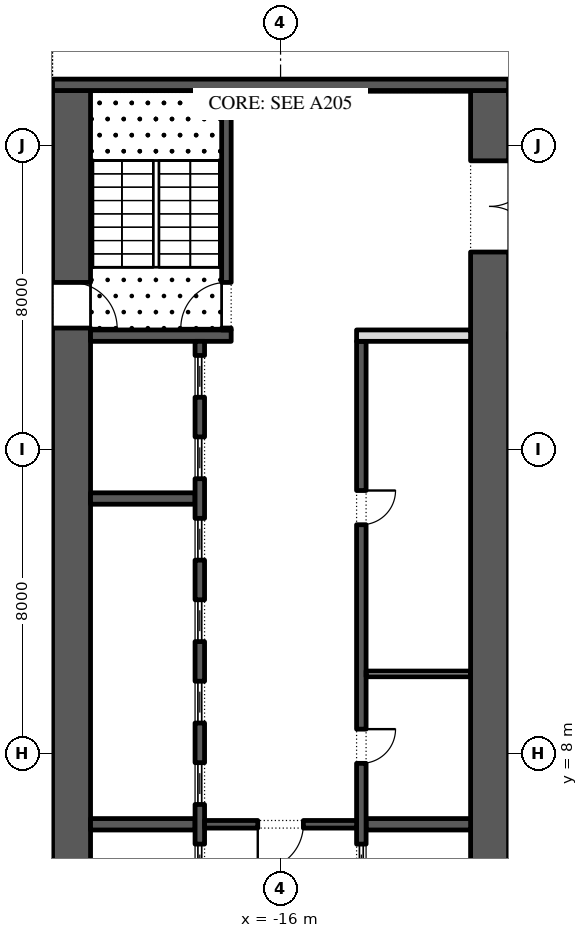
"""IFC4 building model, lengths in metres.
Left out: names, types, materials, properties, quantities, classifications, styles, units other than length and angle.
Written with IfcOpenShell. Run it as: python <this file> out.ifc"""

import sys

from ifc_helpers import new_model, si_unit, direction, frame, frame_2d, origin, place, context, subcontext, project, spatial, rectangle, extrude, element, fill, save


model = new_model("IFC4")
c1 = context("Model", 3, precision=1e-05, world=origin(), true_north=direction((0.0, 1.0)))
c2 = subcontext(c1, "Body", "Model", "MODEL_VIEW")
j1 = project(units=[si_unit("LENGTHUNIT", "METRE"), si_unit("PLANEANGLEUNIT", "RADIAN")], contexts=[c1])
p1 = place(None, origin())
s1 = spatial("IfcSite", under=j1, at=p1, CompositionType="ELEMENT")
p2 = place(p1, origin())
s2 = spatial("IfcBuilding", under=s1, at=p2, CompositionType="ELEMENT")
p3 = place(p2, frame((0.0, 0.0, 14.0)))
s3 = spatial("IfcBuildingStorey", under=s2, at=p3, CompositionType="ELEMENT", Elevation=14.0)
p4 = place(p3, frame((-21.5, -2.45, 0.0), z_axis=(0.0, 0.0, 1.0), x_axis=(0.0, 1.0, 0.0)))
e1 = element("IfcWall", 1, at=p4, inside=s3, PredefinedType="SHEAR", context=c2, shape_type="SweptSolid", body=[
    extrude(rectangle(XDim=27.9, YDim=1.0, at=frame_2d((13.95, 0.0))), origin(), (0.0, 0.0, 1.0), 4.9),
])
p5 = place(p4, frame((5.05, 0.0, 0.0)))
e2 = element("IfcOpeningElement", 2, at=p5, cuts=e1, PredefinedType="OPENING", context=c2, shape_type="SweptSolid", body=[
    extrude(rectangle(XDim=1.2, YDim=2.1, at=frame_2d((0.6, 1.05))), frame((0.0, 0.51, 0.0), z_axis=(0.0, -1.0, 0.0), x_axis=(1.0, 0.0, 0.0)), (0.0, 0.0, 1.0), 1.02),
])
p6 = place(p4, frame((21.65, 0.0, 0.0)))
e3 = element("IfcOpeningElement", 3, at=p6, cuts=e1, PredefinedType="OPENING", context=c2, shape_type="SweptSolid", body=[
    extrude(rectangle(XDim=1.2, YDim=2.1, at=frame_2d((0.6, 1.05))), frame((0.0, 0.51, 0.0), z_axis=(0.0, -1.0, 0.0), x_axis=(1.0, 0.0, 0.0)), (0.0, 0.0, 1.0), 1.02),
])
p7 = place(p3, frame((-10.5, -2.45, 0.0), z_axis=(0.0, 0.0, 1.0), x_axis=(0.0, 1.0, 0.0)))
e4 = element("IfcWall", 4, at=p7, inside=s3, PredefinedType="SHEAR", context=c2, shape_type="SweptSolid", body=[
    extrude(rectangle(XDim=27.9, YDim=1.0, at=frame_2d((13.95, 0.0))), origin(), (0.0, 0.0, 1.0), 4.9),
])
p8 = place(p7, frame((23.65, 0.0, 0.0)))
e5 = element("IfcOpeningElement", 5, at=p8, cuts=e4, PredefinedType="OPENING", context=c2, shape_type="SweptSolid", body=[
    extrude(rectangle(XDim=2.4, YDim=2.1, at=frame_2d((1.2, 1.05))), frame((0.0, 0.51, 0.0), z_axis=(0.0, -1.0, 0.0), x_axis=(1.0, 0.0, 0.0)), (0.0, 0.0, 1.0), 1.02),
])
p9 = place(p7, frame((2.7, 0.0, 0.0)))
e6 = element("IfcOpeningElement", 6, at=p9, cuts=e4, PredefinedType="OPENING", context=c2, shape_type="SweptSolid", body=[
    extrude(rectangle(XDim=0.9, YDim=2.1, at=frame_2d((0.45, 1.05))), frame((0.0, 0.51, 0.0), z_axis=(0.0, -1.0, 0.0), x_axis=(1.0, 0.0, 0.0)), (0.0, 0.0, 1.0), 1.02),
])
p10 = place(p3, frame((-22.0, 25.6, 0.0), z_axis=(0.0, 0.0, 1.0), x_axis=(1.0, 0.0, 0.0)))
e7 = element("IfcWall", 7, at=p10, inside=s3, PredefinedType="SHEAR", context=c2, shape_type="SweptSolid", body=[
    extrude(rectangle(XDim=12.0, YDim=0.3, at=frame_2d((6.0, 0.0))), origin(), (0.0, 0.0, 1.0), 4.9),
])
p11 = place(p3, frame((-21.0, 19.0, 0.0), z_axis=(0.0, 0.0, 1.0), x_axis=(1.0, 0.0, 0.0)))
e8 = element("IfcWall", 8, at=p11, inside=s3, PredefinedType="SHEAR", context=c2, shape_type="SweptSolid", body=[
    extrude(rectangle(XDim=3.7, YDim=0.3, at=frame_2d((1.85, 0.0))), origin(), (0.0, 0.0, 1.0), 4.9),
])
p12 = place(p3, frame((-17.425, 19.15, 0.0), z_axis=(0.0, 0.0, 1.0), x_axis=(0.0, 1.0, 0.0)))
e9 = element("IfcWall", 9, at=p12, inside=s3, PredefinedType="SHEAR", context=c2, shape_type="SweptSolid", body=[
    extrude(rectangle(XDim=6.3, YDim=0.25, at=frame_2d((3.15, 0.0))), origin(), (0.0, 0.0, 1.0), 4.9),
])
p13 = place(p12, frame((0.05, 0.0, 0.0)))
e10 = element("IfcOpeningElement", 10, at=p13, cuts=e9, PredefinedType="OPENING", context=c2, shape_type="SweptSolid", body=[
    extrude(rectangle(XDim=1.2, YDim=2.1, at=frame_2d((0.6, 1.05))), frame((0.0, 0.135, 0.0), z_axis=(0.0, -1.0, 0.0), x_axis=(1.0, 0.0, 0.0)), (0.0, 0.0, 1.0), 0.27),
])
for number, where, z_axis, x_axis in (
    (11, (-21.0, 6.143, 0.0), (0.0, 0.0, 1.0), (1.0, 0.0, 0.0)),
    (12, (-21.0, 14.714, 0.0), (0.0, 0.0, 1.0), (1.0, 0.0, 0.0)),
):
    element("IfcWall", number, at=place(p3, frame(where, z_axis=z_axis, x_axis=x_axis)), inside=s3, PredefinedType="SHEAR", context=c2, shape_type="SweptSolid", body=[
        extrude(rectangle(XDim=2.75, YDim=0.3, at=frame_2d((1.375, 0.0))), origin(), (0.0, 0.0, 1.0), 4.9),
    ])
p14 = place(p3, frame((-18.125, 4.15, 0.0), z_axis=(0.0, 0.0, 1.0), x_axis=(0.0, 1.0, 0.0)))
e13 = element("IfcWall", 13, at=p14, inside=s3, PredefinedType="SHEAR", context=c2, shape_type="SweptSolid", body=[
    extrude(rectangle(XDim=14.7, YDim=0.25, at=frame_2d((7.35, 0.0))), origin(), (0.0, 0.0, 1.0), 4.9),
])
p15 = place(p14, frame((0.371, 0.0, 0.0)))
e14 = element("IfcOpeningElement", 14, at=p15, cuts=e13, PredefinedType="OPENING", context=c2, shape_type="SweptSolid", body=[
    extrude(rectangle(XDim=1.1, YDim=2.1, at=frame_2d((0.55, 1.05))), frame((0.0, 0.135, 0.0), z_axis=(0.0, -1.0, 0.0), x_axis=(1.0, 0.0, 0.0)), (0.0, 0.0, 1.0), 0.27),
])
p16 = place(p14, frame((2.514, 0.0, 0.0)))
e15 = element("IfcOpeningElement", 15, at=p16, cuts=e13, PredefinedType="OPENING", context=c2, shape_type="SweptSolid", body=[
    extrude(rectangle(XDim=1.1, YDim=2.1, at=frame_2d((0.55, 1.05))), frame((0.0, 0.135, 0.0), z_axis=(0.0, -1.0, 0.0), x_axis=(1.0, 0.0, 0.0)), (0.0, 0.0, 1.0), 0.27),
])
p17 = place(p14, frame((4.657, 0.0, 0.0)))
e16 = element("IfcOpeningElement", 16, at=p17, cuts=e13, PredefinedType="OPENING", context=c2, shape_type="SweptSolid", body=[
    extrude(rectangle(XDim=1.1, YDim=2.1, at=frame_2d((0.55, 1.05))), frame((0.0, 0.135, 0.0), z_axis=(0.0, -1.0, 0.0), x_axis=(1.0, 0.0, 0.0)), (0.0, 0.0, 1.0), 0.27),
])
p18 = place(p14, frame((6.8, 0.0, 0.0)))
e17 = element("IfcOpeningElement", 17, at=p18, cuts=e13, PredefinedType="OPENING", context=c2, shape_type="SweptSolid", body=[
    extrude(rectangle(XDim=1.1, YDim=2.1, at=frame_2d((0.55, 1.05))), frame((0.0, 0.135, 0.0), z_axis=(0.0, -1.0, 0.0), x_axis=(1.0, 0.0, 0.0)), (0.0, 0.0, 1.0), 0.27),
])
p19 = place(p14, frame((8.943, 0.0, 0.0)))
e18 = element("IfcOpeningElement", 18, at=p19, cuts=e13, PredefinedType="OPENING", context=c2, shape_type="SweptSolid", body=[
    extrude(rectangle(XDim=1.1, YDim=2.1, at=frame_2d((0.55, 1.05))), frame((0.0, 0.135, 0.0), z_axis=(0.0, -1.0, 0.0), x_axis=(1.0, 0.0, 0.0)), (0.0, 0.0, 1.0), 0.27),
])
p20 = place(p14, frame((11.086, 0.0, 0.0)))
e19 = element("IfcOpeningElement", 19, at=p20, cuts=e13, PredefinedType="OPENING", context=c2, shape_type="SweptSolid", body=[
    extrude(rectangle(XDim=1.1, YDim=2.1, at=frame_2d((0.55, 1.05))), frame((0.0, 0.135, 0.0), z_axis=(0.0, -1.0, 0.0), x_axis=(1.0, 0.0, 0.0)), (0.0, 0.0, 1.0), 0.27),
])
p21 = place(p14, frame((13.229, 0.0, 0.0)))
e20 = element("IfcOpeningElement", 20, at=p21, cuts=e13, PredefinedType="OPENING", context=c2, shape_type="SweptSolid", body=[
    extrude(rectangle(XDim=1.1, YDim=2.1, at=frame_2d((0.55, 1.05))), frame((0.0, 0.135, 0.0), z_axis=(0.0, -1.0, 0.0), x_axis=(1.0, 0.0, 0.0)), (0.0, 0.0, 1.0), 0.27),
])
p22 = place(p3, frame((-13.75, 6.143, 0.0), z_axis=(0.0, 0.0, 1.0), x_axis=(1.0, 0.0, 0.0)))
e21 = element("IfcWall", 21, at=p22, inside=s3, PredefinedType="SHEAR", context=c2, shape_type="SweptSolid", body=[
    extrude(rectangle(XDim=2.75, YDim=0.3, at=frame_2d((1.375, 0.0))), origin(), (0.0, 0.0, 1.0), 4.9),
])
p23 = place(p3, frame((-13.875, -2.45, 0.0), z_axis=(0.0, 0.0, 1.0), x_axis=(0.0, 1.0, 0.0)))
e22 = element("IfcWall", 22, at=p23, inside=s3, PredefinedType="SHEAR", context=c2, shape_type="SweptSolid", body=[
    extrude(rectangle(XDim=21.3, YDim=0.25, at=frame_2d((10.65, 0.0))), origin(), (0.0, 0.0, 1.0), 4.9),
])
p24 = place(p23, frame((10.196, 0.0, 0.0)))
e23 = element("IfcOpeningElement", 23, at=p24, cuts=e22, PredefinedType="OPENING", context=c2, shape_type="SweptSolid", body=[
    extrude(rectangle(XDim=0.9, YDim=2.1, at=frame_2d((0.45, 1.05))), frame((0.0, 0.135, 0.0), z_axis=(0.0, -1.0, 0.0), x_axis=(1.0, 0.0, 0.0)), (0.0, 0.0, 1.0), 0.27),
])
p25 = place(p23, frame((16.475, 0.0, 0.0)))
e24 = element("IfcOpeningElement", 24, at=p25, cuts=e22, PredefinedType="OPENING", context=c2, shape_type="SweptSolid", body=[
    extrude(rectangle(XDim=0.9, YDim=2.1, at=frame_2d((0.45, 1.05))), frame((0.0, 0.135, 0.0), z_axis=(0.0, -1.0, 0.0), x_axis=(1.0, 0.0, 0.0)), (0.0, 0.0, 1.0), 0.27),
])
p26 = place(p23, frame((6.971, 0.0, 0.0)))
e25 = element("IfcOpeningElement", 25, at=p26, cuts=e22, PredefinedType="OPENING", context=c2, shape_type="SweptSolid", body=[
    extrude(rectangle(XDim=1.1, YDim=2.1, at=frame_2d((0.55, 1.05))), frame((0.0, 0.135, 0.0), z_axis=(0.0, -1.0, 0.0), x_axis=(1.0, 0.0, 0.0)), (0.0, 0.0, 1.0), 0.27),
])
p27 = place(p3, frame((-14.0, 19.0, 0.0), z_axis=(0.0, 0.0, 1.0), x_axis=(1.0, 0.0, 0.0)))
e26 = element("IfcWall", 26, at=p27, inside=s3, PredefinedType="PARTITIONING", context=c2, shape_type="SweptSolid", body=[
    extrude(rectangle(XDim=3.0, YDim=0.3, at=frame_2d((1.5, 0.0))), origin(), (0.0, 0.0, 1.0), 4.9),
])
p28 = place(p3, frame((-13.75, 10.1, 0.0), z_axis=(0.0, 0.0, 1.0), x_axis=(1.0, 0.0, 0.0)))
e27 = element("IfcWall", 27, at=p28, inside=s3, PredefinedType="PARTITIONING", context=c2, shape_type="SweptSolid", body=[
    extrude(rectangle(XDim=2.75, YDim=0.15, at=frame_2d((1.375, 0.0))), origin(), (0.0, 0.0, 1.0), 4.9),
])
p29 = place(p3, frame((-18.0, 6.143, 0.0), z_axis=(0.0, 0.0, 1.0), x_axis=(1.0, 0.0, 0.0)))
e28 = element("IfcWall", 28, at=p29, inside=s3, PredefinedType="SHEAR", context=c2, shape_type="SweptSolid", body=[
    extrude(rectangle(XDim=4.0, YDim=0.2, at=frame_2d((2.0, 0.0))), origin(), (0.0, 0.0, 1.0), 4.9),
])
p30 = place(p29, frame((1.4, 0.0, 0.0)))
e29 = element("IfcOpeningElement", 29, at=p30, cuts=e28, PredefinedType="OPENING", context=c2, shape_type="SweptSolid", body=[
    extrude(rectangle(XDim=1.2, YDim=2.1, at=frame_2d((0.6, 1.05))), frame((0.0, 0.11, 0.0), z_axis=(0.0, -1.0, 0.0), x_axis=(1.0, 0.0, 0.0)), (0.0, 0.0, 1.0), 0.22),
])
p31 = place(p3, frame((-10.0, 19.0, 0.0), z_axis=(0.0, 0.0, 1.0), x_axis=(1.0, 0.0, 0.0)))
e30 = element("IfcWall", 30, at=p31, inside=s3, PredefinedType="PARTITIONING", context=c2, shape_type="SweptSolid", body=[
    extrude(rectangle(XDim=7.925, YDim=0.15, at=frame_2d((3.962, 0.0))), origin(), (0.0, 0.0, 1.0), 4.9),
])
p32 = place(p3, frame((-10.0, 25.4, 0.0), z_axis=(0.0, 0.0, 1.0), x_axis=(1.0, 0.0, 0.0)))
e31 = element("IfcWall", 31, at=p32, inside=s3, PredefinedType="PARTITIONING", context=c2, shape_type="SweptSolid", body=[
    extrude(rectangle(XDim=7.925, YDim=0.15, at=frame_2d((3.962, 0.0))), origin(), (0.0, 0.0, 1.0), 4.9),
])
p33 = place(p32, frame((3.462, 0.0, 0.0)))
e32 = element("IfcOpeningElement", 32, at=p33, cuts=e31, PredefinedType="OPENING", context=c2, shape_type="SweptSolid", body=[
    extrude(rectangle(XDim=1.0, YDim=2.1, at=frame_2d((0.5, 1.05))), frame((0.0, 0.085, 0.0), z_axis=(0.0, -1.0, 0.0), x_axis=(1.0, 0.0, 0.0)), (0.0, 0.0, 1.0), 0.17),
])
p34 = place(p15, origin())
e33 = element("IfcDoor", 33, at=p34, inside=s3, OperationType="SLIDING_TO_LEFT", PredefinedType="DOOR", context=c2, shape_type="SweptSolid", body=[
    extrude(rectangle(XDim=1.1, YDim=2.1, at=frame_2d((0.55, 1.05))), frame((0.0, 0.025, 0.0), z_axis=(0.0, -1.0, 0.0), x_axis=(1.0, 0.0, 0.0)), (0.0, 0.0, 1.0), 0.05),
])
fill(e14, e33)
p35 = place(p16, origin())
e34 = element("IfcDoor", 34, at=p35, inside=s3, OperationType="SLIDING_TO_LEFT", PredefinedType="DOOR", context=c2, shape_type="SweptSolid", body=[
    extrude(rectangle(XDim=1.1, YDim=2.1, at=frame_2d((0.55, 1.05))), frame((0.0, 0.025, 0.0), z_axis=(0.0, -1.0, 0.0), x_axis=(1.0, 0.0, 0.0)), (0.0, 0.0, 1.0), 0.05),
])
fill(e15, e34)
p36 = place(p17, origin())
e35 = element("IfcDoor", 35, at=p36, inside=s3, OperationType="SLIDING_TO_LEFT", PredefinedType="DOOR", context=c2, shape_type="SweptSolid", body=[
    extrude(rectangle(XDim=1.1, YDim=2.1, at=frame_2d((0.55, 1.05))), frame((0.0, 0.025, 0.0), z_axis=(0.0, -1.0, 0.0), x_axis=(1.0, 0.0, 0.0)), (0.0, 0.0, 1.0), 0.05),
])
fill(e16, e35)
p37 = place(p18, origin())
e36 = element("IfcDoor", 36, at=p37, inside=s3, OperationType="SLIDING_TO_LEFT", PredefinedType="DOOR", context=c2, shape_type="SweptSolid", body=[
    extrude(rectangle(XDim=1.1, YDim=2.1, at=frame_2d((0.55, 1.05))), frame((0.0, 0.025, 0.0), z_axis=(0.0, -1.0, 0.0), x_axis=(1.0, 0.0, 0.0)), (0.0, 0.0, 1.0), 0.05),
])
fill(e17, e36)
p38 = place(p19, origin())
e37 = element("IfcDoor", 37, at=p38, inside=s3, OperationType="SLIDING_TO_LEFT", PredefinedType="DOOR", context=c2, shape_type="SweptSolid", body=[
    extrude(rectangle(XDim=1.1, YDim=2.1, at=frame_2d((0.55, 1.05))), frame((0.0, 0.025, 0.0), z_axis=(0.0, -1.0, 0.0), x_axis=(1.0, 0.0, 0.0)), (0.0, 0.0, 1.0), 0.05),
])
fill(e18, e37)
p39 = place(p20, origin())
e38 = element("IfcDoor", 38, at=p39, inside=s3, OperationType="SLIDING_TO_LEFT", PredefinedType="DOOR", context=c2, shape_type="SweptSolid", body=[
    extrude(rectangle(XDim=1.1, YDim=2.1, at=frame_2d((0.55, 1.05))), frame((0.0, 0.025, 0.0), z_axis=(0.0, -1.0, 0.0), x_axis=(1.0, 0.0, 0.0)), (0.0, 0.0, 1.0), 0.05),
])
fill(e19, e38)
p40 = place(p21, origin())
e39 = element("IfcDoor", 39, at=p40, inside=s3, OperationType="SLIDING_TO_LEFT", PredefinedType="DOOR", context=c2, shape_type="SweptSolid", body=[
    extrude(rectangle(XDim=1.1, YDim=2.1, at=frame_2d((0.55, 1.05))), frame((0.0, 0.025, 0.0), z_axis=(0.0, -1.0, 0.0), x_axis=(1.0, 0.0, 0.0)), (0.0, 0.0, 1.0), 0.05),
])
fill(e20, e39)
p41 = place(p24, frame((0.9, -0.2, 0.0), z_axis=(0.0, 0.0, 1.0), x_axis=(-1.0, 0.0, 0.0)))
e40 = element("IfcDoor", 40, at=p41, inside=s3, OperationType="SINGLE_SWING_RIGHT", PredefinedType="DOOR", context=c2, shape_type="SweptSolid", body=[
    extrude(rectangle(XDim=0.9, YDim=2.1, at=frame_2d((0.45, 1.05))), frame((0.0, -0.075, 0.0), z_axis=(0.0, -1.0, 0.0), x_axis=(1.0, 0.0, 0.0)), (0.0, 0.0, 1.0), 0.05),
])
fill(e23, e40)
p42 = place(p25, frame((0.9, -0.2, 0.0), z_axis=(0.0, 0.0, 1.0), x_axis=(-1.0, 0.0, 0.0)))
e41 = element("IfcDoor", 41, at=p42, inside=s3, OperationType="SINGLE_SWING_RIGHT", PredefinedType="DOOR", context=c2, shape_type="SweptSolid", body=[
    extrude(rectangle(XDim=0.9, YDim=2.1, at=frame_2d((0.45, 1.05))), frame((0.0, -0.075, 0.0), z_axis=(0.0, -1.0, 0.0), x_axis=(1.0, 0.0, 0.0)), (0.0, 0.0, 1.0), 0.05),
])
fill(e24, e41)
p43 = place(p26, origin())
e42 = element("IfcDoor", 42, at=p43, inside=s3, OperationType="SLIDING_TO_LEFT", PredefinedType="DOOR", context=c2, shape_type="SweptSolid", body=[
    extrude(rectangle(XDim=1.1, YDim=2.1, at=frame_2d((0.55, 1.05))), frame((0.0, 0.025, 0.0), z_axis=(0.0, -1.0, 0.0), x_axis=(1.0, 0.0, 0.0)), (0.0, 0.0, 1.0), 0.05),
])
fill(e25, e42)
p44 = place(p30, frame((1.2, 0.0, 0.0), z_axis=(0.0, 0.0, 1.0), x_axis=(-1.0, 0.0, 0.0)))
e43 = element("IfcDoor", 43, at=p44, inside=s3, OperationType="SINGLE_SWING_LEFT", PredefinedType="DOOR", context=c2, shape_type="SweptSolid", body=[
    extrude(rectangle(XDim=1.2, YDim=2.1, at=frame_2d((0.6, 1.05))), frame((0.0, 0.025, 0.0), z_axis=(0.0, -1.0, 0.0), x_axis=(1.0, 0.0, 0.0)), (0.0, 0.0, 1.0), 0.05),
])
fill(e29, e43)
p45 = place(p8, frame((2.4, 0.0, 0.0), z_axis=(0.0, 0.0, 1.0), x_axis=(-1.0, 0.0, 0.0)))
e44 = element("IfcDoor", 44, at=p45, inside=s3, OperationType="DOUBLE_DOOR_SINGLE_SWING", PredefinedType="DOOR", context=c2, shape_type="SweptSolid", body=[
    extrude(rectangle(XDim=2.4, YDim=2.1, at=frame_2d((1.2, 1.05))), frame((0.0, 0.025, 0.0), z_axis=(0.0, -1.0, 0.0), x_axis=(1.0, 0.0, 0.0)), (0.0, 0.0, 1.0), 0.05),
])
fill(e5, e44)
p46 = place(p13, origin())
e45 = element("IfcDoor", 45, at=p46, inside=s3, OperationType="SINGLE_SWING_RIGHT", PredefinedType="DOOR", context=c2, shape_type="SweptSolid", body=[
    extrude(rectangle(XDim=1.2, YDim=2.1, at=frame_2d((0.6, 1.05))), frame((0.0, 0.025, 0.0), z_axis=(0.0, -1.0, 0.0), x_axis=(1.0, 0.0, 0.0)), (0.0, 0.0, 1.0), 0.05),
])
fill(e10, e45)
p47 = place(p6, frame((1.2, 0.0, 0.0), z_axis=(0.0, 0.0, 1.0), x_axis=(-1.0, 0.0, 0.0)))
e46 = element("IfcDoor", 46, at=p47, inside=s3, OperationType="SINGLE_SWING_LEFT", PredefinedType="DOOR", context=c2, shape_type="SweptSolid", body=[
    extrude(rectangle(XDim=1.2, YDim=2.1, at=frame_2d((0.6, 1.05))), frame((0.0, 0.025, 0.0), z_axis=(0.0, -1.0, 0.0), x_axis=(1.0, 0.0, 0.0)), (0.0, 0.0, 1.0), 0.05),
])
fill(e3, e46)
save(model, sys.argv[1])
